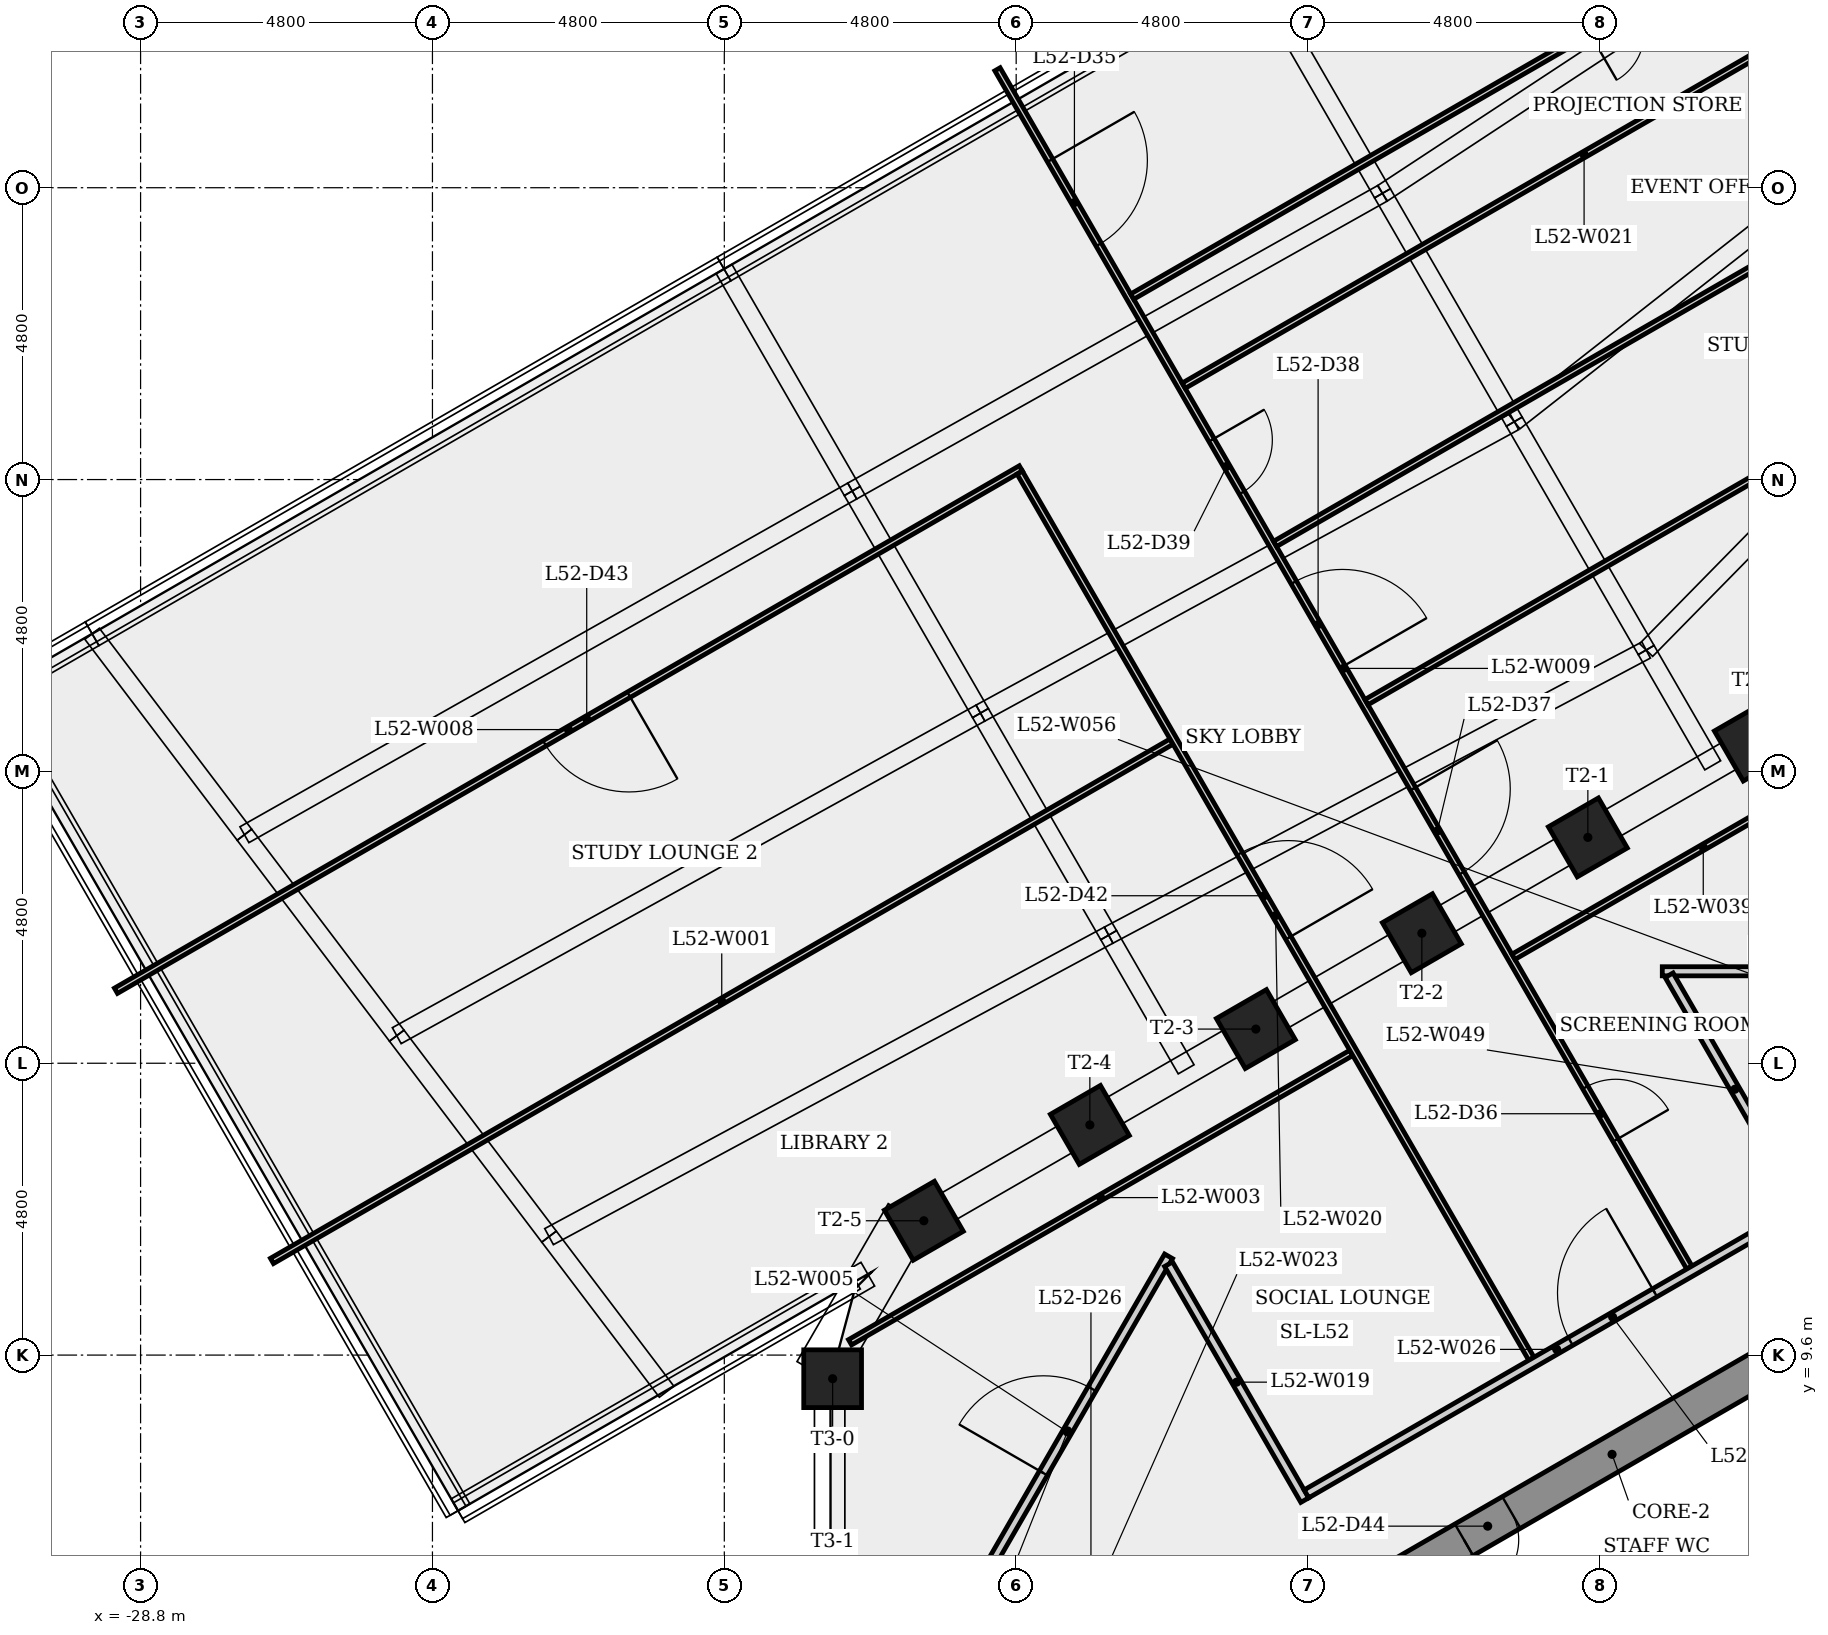
"""IFC4 building model, lengths in metres.
Left out: names, types, materials, properties, quantities, classifications, styles, units other than length and angle.
Written with IfcOpenShell. Run it as: python <this file> out.ifc"""

import sys

from ifc_helpers import new_model, si_unit, direction, frame, frame_2d, origin, origin_2d, place, context, subcontext, project, spatial, rectangle, extrude, element, fill, save


model = new_model("IFC4")
c1 = context("Model", 3, precision=1e-05, world=origin(), true_north=direction((0.0, 1.0)))
c2 = subcontext(c1, "Body", "Model", "MODEL_VIEW")
j1 = project(units=[si_unit("LENGTHUNIT", "METRE"), si_unit("PLANEANGLEUNIT", "RADIAN")], contexts=[c1])
p1 = place(None, origin())
s1 = spatial("IfcSite", under=j1, at=p1, CompositionType="ELEMENT")
p2 = place(p1, origin())
s2 = spatial("IfcBuilding", under=s1, at=p2, CompositionType="ELEMENT")
p3 = place(p2, frame((0.0, 0.0, 194.7)))
s3 = spatial("IfcBuildingStorey", under=s2, at=p3, CompositionType="ELEMENT", Elevation=194.7)
p4 = place(p3, frame((0.15, 10.71, 0.0), z_axis=(0.0, 0.0, 1.0), x_axis=(-0.866023993627, -0.500002442456, 0.0)))
e1 = element("IfcWall", 1, at=p4, inside=s3, PredefinedType="SHEAR", context=c2, shape_type="SweptSolid", body=[
    extrude(rectangle(XDim=10.97, YDim=0.6, at=frame_2d((5.485, 0.0))), origin(), (0.0, 0.0, 1.0), 4.0),
])
p5 = place(p4, frame((7.397, 0.0, 0.0)))
e2 = element("IfcOpeningElement", 2, at=p5, cuts=e1, PredefinedType="OPENING", context=c2, shape_type="SweptSolid", body=[
    extrude(rectangle(XDim=0.9, YDim=2.1, at=frame_2d((0.45, 1.05))), frame((0.0, 0.31, 0.0), z_axis=(0.0, -1.0, 0.0), x_axis=(1.0, 0.0, 0.0)), (0.0, 0.0, 1.0), 0.62),
])
for number, where, z_axis, x_axis in (
    (3, (-2.268, 19.691, 0.0), (0.0, 0.0, 1.0), (-0.5, 0.866, 0.0)),
    (4, (-4.998, 18.114, 0.0), (0.0, 0.0, 1.0), (-0.5, 0.866, 0.0)),
    (5, (-7.728, 16.538, 0.0), (0.0, 0.0, 1.0), (-0.5, 0.866, 0.0)),
    (6, (-10.458, 14.962, 0.0), (0.0, 0.0, 1.0), (-0.5, 0.866, 0.0)),
    (7, (-13.188, 13.386, 0.0), (0.0, 0.0, 1.0), (-0.5, 0.866, 0.0)),
    (8, (-15.918, 11.809, 0.0), (0.0, 0.0, 1.0), (-0.5, 0.866, 0.0)),
    (9, (-17.418, 9.211, 0.0), (0.0, 0.0, 1.0), (-1.0, 0.0, 0.0)),
):
    element("IfcColumn", number, at=place(p3, frame(where, z_axis=z_axis, x_axis=x_axis)), inside=s3, PredefinedType="COLUMN", context=c2, shape_type="SweptSolid", body=[
        extrude(rectangle(XDim=0.95, YDim=0.95, at=origin_2d()), origin(), (0.0, 0.0, 1.0), 4.0),
    ])
p6 = place(p3, frame((-26.639, 11.149, 0.0), z_axis=(0.0, 0.0, 1.0), x_axis=(0.866027084608, 0.499997088717, 0.0)))
e10 = element("IfcWall", 10, at=p6, inside=s3, PredefinedType="PARTITIONING", context=c2, shape_type="SweptSolid", body=[
    extrude(rectangle(XDim=17.083, YDim=0.1, at=frame_2d((8.542, 0.0))), origin(), (0.0, 0.0, 1.0), 3.65),
])
p7 = place(p3, frame((-17.132, 9.811, 0.0), z_axis=(0.0, 0.0, 1.0), x_axis=(0.866021566356, 0.500006646563, 0.0)))
e11 = element("IfcWall", 11, at=p7, inside=s3, PredefinedType="PARTITIONING", context=c2, shape_type="SweptSolid", body=[
    extrude(rectangle(XDim=9.518, YDim=0.1, at=frame_2d((4.759, 0.0))), origin(), (0.0, 0.0, 1.0), 3.65),
])
p8 = place(p3, frame((-15.228, 5.45, 0.0), z_axis=(0.0, 0.0, 1.0), x_axis=(0.499982336103, 0.8660356018, 0.0)))
e12 = element("IfcWall", 12, at=p8, inside=s3, PredefinedType="PARTITIONING", context=c2, shape_type="SweptSolid", body=[
    extrude(rectangle(XDim=6.668, YDim=0.15, at=frame_2d((3.334, 0.0))), origin(), (0.0, 0.0, 1.0), 3.65),
])
p9 = place(p8, frame((2.552, 0.0, 0.0)))
e13 = element("IfcOpeningElement", 13, at=p9, cuts=e12, PredefinedType="OPENING", context=c2, shape_type="SweptSolid", body=[
    extrude(rectangle(XDim=1.6, YDim=2.1, at=frame_2d((0.8, 1.05))), frame((0.0, 0.085, 0.0), z_axis=(0.0, -1.0, 0.0), x_axis=(1.0, 0.0, 0.0)), (0.0, 0.0, 1.0), 0.17),
])
p10 = place(p3, frame((-14.324, 24.184, 0.0), z_axis=(0.0, 0.0, 1.0), x_axis=(-0.866026824701, -0.499997538892, 0.0)))
e14 = element("IfcWall", 14, at=p10, inside=s3, PredefinedType="PARTITIONING", context=c2, shape_type="SweptSolid", body=[
    extrude(rectangle(XDim=17.183, YDim=0.1, at=frame_2d((8.592, 0.0))), origin(), (0.0, 0.0, 1.0), 3.65),
])
p11 = place(p10, frame((7.444, 0.0, 0.0)))
e15 = element("IfcOpeningElement", 15, at=p11, cuts=e14, PredefinedType="OPENING", context=c2, shape_type="SweptSolid", body=[
    extrude(rectangle(XDim=1.6, YDim=2.1, at=frame_2d((0.8, 1.05))), frame((0.0, 0.06, 0.0), z_axis=(0.0, -1.0, 0.0), x_axis=(1.0, 0.0, 0.0)), (0.0, 0.0, 1.0), 0.12),
])
p12 = place(p3, frame((-14.708, 30.748, 0.0), z_axis=(0.0, 0.0, 1.0), x_axis=(0.499993923875, -0.866028911808, 0.0)))
e16 = element("IfcWall", 16, at=p12, inside=s3, PredefinedType="PARTITIONING", context=c2, shape_type="SweptSolid", body=[
    extrude(rectangle(XDim=22.758, YDim=0.1, at=frame_2d((11.379, 0.0))), origin(), (0.0, 0.0, 1.0), 3.65),
])
p13 = place(p12, frame((1.731, 0.0, 0.0)))
e17 = element("IfcOpeningElement", 17, at=p13, cuts=e16, PredefinedType="OPENING", context=c2, shape_type="SweptSolid", body=[
    extrude(rectangle(XDim=1.6, YDim=2.1, at=frame_2d((0.8, 1.05))), frame((0.0, 0.06, 0.0), z_axis=(0.0, -1.0, 0.0), x_axis=(1.0, 0.0, 0.0)), (0.0, 0.0, 1.0), 0.12),
])
p14 = place(p12, frame((19.336, 0.0, 0.0)))
e18 = element("IfcOpeningElement", 18, at=p14, cuts=e16, PredefinedType="OPENING", context=c2, shape_type="SweptSolid", body=[
    extrude(rectangle(XDim=1.0, YDim=2.1, at=frame_2d((0.5, 1.05))), frame((0.0, 0.06, 0.0), z_axis=(0.0, -1.0, 0.0), x_axis=(1.0, 0.0, 0.0)), (0.0, 0.0, 1.0), 0.12),
])
p15 = place(p12, frame((13.667, 0.0, 0.0)))
e19 = element("IfcOpeningElement", 19, at=p15, cuts=e16, PredefinedType="OPENING", context=c2, shape_type="SweptSolid", body=[
    extrude(rectangle(XDim=1.6, YDim=2.1, at=frame_2d((0.8, 1.05))), frame((0.0, 0.06, 0.0), z_axis=(0.0, -1.0, 0.0), x_axis=(1.0, 0.0, 0.0)), (0.0, 0.0, 1.0), 0.12),
])
p16 = place(p12, frame((9.746, 0.0, 0.0)))
e20 = element("IfcOpeningElement", 20, at=p16, cuts=e16, PredefinedType="OPENING", context=c2, shape_type="SweptSolid", body=[
    extrude(rectangle(XDim=1.6, YDim=2.1, at=frame_2d((0.8, 1.05))), frame((0.0, 0.06, 0.0), z_axis=(0.0, -1.0, 0.0), x_axis=(1.0, 0.0, 0.0)), (0.0, 0.0, 1.0), 0.12),
])
p17 = place(p12, frame((7.041, 0.0, 0.0)))
e21 = element("IfcOpeningElement", 21, at=p17, cuts=e16, PredefinedType="OPENING", context=c2, shape_type="SweptSolid", body=[
    extrude(rectangle(XDim=1.0, YDim=2.1, at=frame_2d((0.5, 1.05))), frame((0.0, 0.06, 0.0), z_axis=(0.0, -1.0, 0.0), x_axis=(1.0, 0.0, 0.0)), (0.0, 0.0, 1.0), 0.12),
])
p18 = place(p3, frame((-11.894, 11.095, 0.0), z_axis=(0.0, 0.0, 1.0), x_axis=(0.500030632641, -0.866007717299, 0.0)))
e22 = element("IfcWall", 22, at=p18, inside=s3, PredefinedType="PARTITIONING", context=c2, shape_type="SweptSolid", body=[
    extrude(rectangle(XDim=4.48, YDim=0.15, at=frame_2d((2.24, 0.0))), origin(), (0.0, 0.0, 1.0), 3.65),
])
p19 = place(p3, frame((-14.342, 24.115, 0.0), z_axis=(0.0, 0.0, 1.0), x_axis=(0.500000372387, -0.866025188786, 0.0)))
e23 = element("IfcWall", 23, at=p19, inside=s3, PredefinedType="PARTITIONING", context=c2, shape_type="SweptSolid", body=[
    extrude(rectangle(XDim=16.831, YDim=0.1, at=frame_2d((8.415, 0.0))), origin(), (0.0, 0.0, 1.0), 3.65),
])
p20 = place(p19, frame((7.237, 0.0, 0.0)))
e24 = element("IfcOpeningElement", 24, at=p20, cuts=e23, PredefinedType="OPENING", context=c2, shape_type="SweptSolid", body=[
    extrude(rectangle(XDim=1.6, YDim=2.1, at=frame_2d((0.8, 1.05))), frame((0.0, 0.06, 0.0), z_axis=(0.0, -1.0, 0.0), x_axis=(1.0, 0.0, 0.0)), (0.0, 0.0, 1.0), 0.12),
])
p21 = place(p3, frame((-11.645, 25.544, 0.0), z_axis=(0.0, 0.0, 1.0), x_axis=(0.866029456041, 0.49999298122, 0.0)))
e25 = element("IfcWall", 25, at=p21, inside=s3, PredefinedType="PARTITIONING", context=c2, shape_type="SweptSolid", body=[
    extrude(rectangle(XDim=19.009, YDim=0.1, at=frame_2d((9.504, 0.0))), origin(), (0.0, 0.0, 1.0), 3.65),
])
p22 = place(p3, frame((-10.142, 22.941, 0.0), z_axis=(0.0, 0.0, 1.0), x_axis=(0.866020683813, 0.50000817514, 0.0)))
e26 = element("IfcWall", 26, at=p22, inside=s3, PredefinedType="PARTITIONING", context=c2, shape_type="SweptSolid", body=[
    extrude(rectangle(XDim=19.009, YDim=0.1, at=frame_2d((9.504, 0.0))), origin(), (0.0, 0.0, 1.0), 3.275),
])
p23 = place(p3, frame((-9.626, 7.317, 0.0), z_axis=(0.0, 0.0, 1.0), x_axis=(0.866032896488, 0.499987022033, 0.0)))
e27 = element("IfcWall", 27, at=p23, inside=s3, PredefinedType="PARTITIONING", context=c2, shape_type="SweptSolid", body=[
    extrude(rectangle(XDim=9.506, YDim=0.15, at=frame_2d((4.753, 0.0))), origin(), (0.0, 0.0, 1.0), 3.65),
])
p24 = place(p23, frame((5.015, 0.0, 0.0)))
e28 = element("IfcOpeningElement", 28, at=p24, cuts=e27, PredefinedType="OPENING", context=c2, shape_type="SweptSolid", body=[
    extrude(rectangle(XDim=1.6, YDim=2.1, at=frame_2d((0.8, 1.05))), frame((0.0, 0.085, 0.0), z_axis=(0.0, -1.0, 0.0), x_axis=(1.0, 0.0, 0.0)), (0.0, 0.0, 1.0), 0.17),
])
p25 = place(p3, frame((-8.64, 20.339, 0.0), z_axis=(0.0, 0.0, 1.0), x_axis=(0.866023894726, 0.500002613756, 0.0)))
e29 = element("IfcWall", 29, at=p25, inside=s3, PredefinedType="PARTITIONING", context=c2, shape_type="SweptSolid", body=[
    extrude(rectangle(XDim=19.009, YDim=0.1, at=frame_2d((9.505, 0.0))), origin(), (0.0, 0.0, 1.0), 3.275),
])
p26 = place(p3, frame((-6.222, 16.151, 0.0), z_axis=(0.0, 0.0, 1.0), x_axis=(0.866025419677, 0.499999972474, 0.0)))
e30 = element("IfcWall", 30, at=p26, inside=s3, PredefinedType="PARTITIONING", context=c2, shape_type="SweptSolid", body=[
    extrude(rectangle(XDim=7.209, YDim=0.1, at=frame_2d((3.604, 0.0))), origin(), (0.0, 0.0, 1.0), 3.65),
])
p27 = place(p3, frame((-3.774, 15.913, 0.0), z_axis=(0.0, 0.0, 1.0), x_axis=(1.0, 0.0, 0.0)))
e31 = element("IfcWall", 31, at=p27, inside=s3, PredefinedType="PARTITIONING", context=c2, shape_type="SweptSolid", body=[
    extrude(rectangle(XDim=4.522, YDim=0.15, at=frame_2d((2.261, 0.0))), origin(), (0.0, 0.0, 1.0), 3.65),
])
p28 = place(p3, frame((-1.496, 12.098, 0.0), z_axis=(0.0, 0.0, 1.0), x_axis=(-0.500038050611, 0.866003434139, 0.0)))
e32 = element("IfcWall", 32, at=p28, inside=s3, PredefinedType="PARTITIONING", context=c2, shape_type="SweptSolid", body=[
    extrude(rectangle(XDim=4.33, YDim=0.15, at=frame_2d((2.165, 0.0))), origin(), (0.0, 0.0, 1.0), 3.65),
])
p29 = place(p3, frame((3.971, 36.514, 0.0), z_axis=(0.0, 0.0, 1.0), x_axis=(-0.866026245231, -0.499998542569, 0.0)))
e33 = element("IfcWall", 33, at=p29, inside=s3, PredefinedType="PARTITIONING", context=c2, shape_type="SweptSolid", body=[
    extrude(rectangle(XDim=19.009, YDim=0.1, at=frame_2d((9.504, 0.0))), origin(), (0.0, 0.0, 1.0), 3.275),
])
p30 = place(p29, frame((9.427, 0.0, 0.0)))
e34 = element("IfcOpeningElement", 34, at=p30, cuts=e33, PredefinedType="OPENING", context=c2, shape_type="SweptSolid", body=[
    extrude(rectangle(XDim=0.9, YDim=2.1, at=frame_2d((0.45, 1.05))), frame((0.0, 0.06, 0.0), z_axis=(0.0, -1.0, 0.0), x_axis=(1.0, 0.0, 0.0)), (0.0, 0.0, 1.0), 0.12),
])
p31 = place(p24, origin())
e35 = element("IfcDoor", 35, at=p31, inside=s3, OperationType="SINGLE_SWING_RIGHT", PredefinedType="DOOR", context=c2, shape_type="SweptSolid", body=[
    extrude(rectangle(XDim=1.6, YDim=2.1, at=frame_2d((0.8, 1.05))), frame((0.0, 0.025, 0.0), z_axis=(0.0, -1.0, 0.0), x_axis=(1.0, 0.0, 0.0)), (0.0, 0.0, 1.0), 0.05),
])
fill(e28, e35)
p32 = place(p13, origin())
e36 = element("IfcDoor", 36, at=p32, inside=s3, OperationType="SINGLE_SWING_LEFT", PredefinedType="DOOR", context=c2, shape_type="SweptSolid", body=[
    extrude(rectangle(XDim=1.6, YDim=2.1, at=frame_2d((0.8, 1.05))), frame((0.0, 0.025, 0.0), z_axis=(0.0, -1.0, 0.0), x_axis=(1.0, 0.0, 0.0)), (0.0, 0.0, 1.0), 0.05),
])
fill(e17, e36)
p33 = place(p14, origin())
e37 = element("IfcDoor", 37, at=p33, inside=s3, OperationType="SINGLE_SWING_RIGHT", PredefinedType="DOOR", context=c2, shape_type="SweptSolid", body=[
    extrude(rectangle(XDim=1.0, YDim=2.1, at=frame_2d((0.5, 1.05))), frame((0.0, 0.025, 0.0), z_axis=(0.0, -1.0, 0.0), x_axis=(1.0, 0.0, 0.0)), (0.0, 0.0, 1.0), 0.05),
])
fill(e18, e37)
p34 = place(p15, origin())
e38 = element("IfcDoor", 38, at=p34, inside=s3, OperationType="SINGLE_SWING_LEFT", PredefinedType="DOOR", context=c2, shape_type="SweptSolid", body=[
    extrude(rectangle(XDim=1.6, YDim=2.1, at=frame_2d((0.8, 1.05))), frame((0.0, 0.025, 0.0), z_axis=(0.0, -1.0, 0.0), x_axis=(1.0, 0.0, 0.0)), (0.0, 0.0, 1.0), 0.05),
])
fill(e19, e38)
p35 = place(p16, origin())
e39 = element("IfcDoor", 39, at=p35, inside=s3, OperationType="SINGLE_SWING_RIGHT", PredefinedType="DOOR", context=c2, shape_type="SweptSolid", body=[
    extrude(rectangle(XDim=1.6, YDim=2.1, at=frame_2d((0.8, 1.05))), frame((0.0, 0.025, 0.0), z_axis=(0.0, -1.0, 0.0), x_axis=(1.0, 0.0, 0.0)), (0.0, 0.0, 1.0), 0.05),
])
fill(e20, e39)
p36 = place(p17, origin())
e40 = element("IfcDoor", 40, at=p36, inside=s3, OperationType="SINGLE_SWING_LEFT", PredefinedType="DOOR", context=c2, shape_type="SweptSolid", body=[
    extrude(rectangle(XDim=1.0, YDim=2.1, at=frame_2d((0.5, 1.05))), frame((0.0, 0.025, 0.0), z_axis=(0.0, -1.0, 0.0), x_axis=(1.0, 0.0, 0.0)), (0.0, 0.0, 1.0), 0.05),
])
fill(e21, e40)
p37 = place(p9, origin())
e41 = element("IfcDoor", 41, at=p37, inside=s3, OperationType="SINGLE_SWING_LEFT", PredefinedType="DOOR", context=c2, shape_type="SweptSolid", body=[
    extrude(rectangle(XDim=1.6, YDim=2.1, at=frame_2d((0.8, 1.05))), frame((0.0, 0.025, 0.0), z_axis=(0.0, -1.0, 0.0), x_axis=(1.0, 0.0, 0.0)), (0.0, 0.0, 1.0), 0.05),
])
fill(e13, e41)
p38 = place(p20, origin())
e42 = element("IfcDoor", 42, at=p38, inside=s3, OperationType="SINGLE_SWING_RIGHT", PredefinedType="DOOR", context=c2, shape_type="SweptSolid", body=[
    extrude(rectangle(XDim=1.6, YDim=2.1, at=frame_2d((0.8, 1.05))), frame((0.0, 0.025, 0.0), z_axis=(0.0, -1.0, 0.0), x_axis=(1.0, 0.0, 0.0)), (0.0, 0.0, 1.0), 0.05),
])
fill(e24, e42)
p39 = place(p11, origin())
e43 = element("IfcDoor", 43, at=p39, inside=s3, OperationType="SINGLE_SWING_LEFT", PredefinedType="DOOR", context=c2, shape_type="SweptSolid", body=[
    extrude(rectangle(XDim=1.6, YDim=2.1, at=frame_2d((0.8, 1.05))), frame((0.0, 0.025, 0.0), z_axis=(0.0, -1.0, 0.0), x_axis=(1.0, 0.0, 0.0)), (0.0, 0.0, 1.0), 0.05),
])
fill(e15, e43)
p40 = place(p5, origin())
e44 = element("IfcDoor", 44, at=p40, inside=s3, OperationType="SINGLE_SWING_RIGHT", PredefinedType="DOOR", context=c2, shape_type="SweptSolid", body=[
    extrude(rectangle(XDim=0.9, YDim=2.1, at=frame_2d((0.45, 1.05))), frame((0.0, 0.025, 0.0), z_axis=(0.0, -1.0, 0.0), x_axis=(1.0, 0.0, 0.0)), (0.0, 0.0, 1.0), 0.05),
])
fill(e2, e44)
save(model, sys.argv[1])
